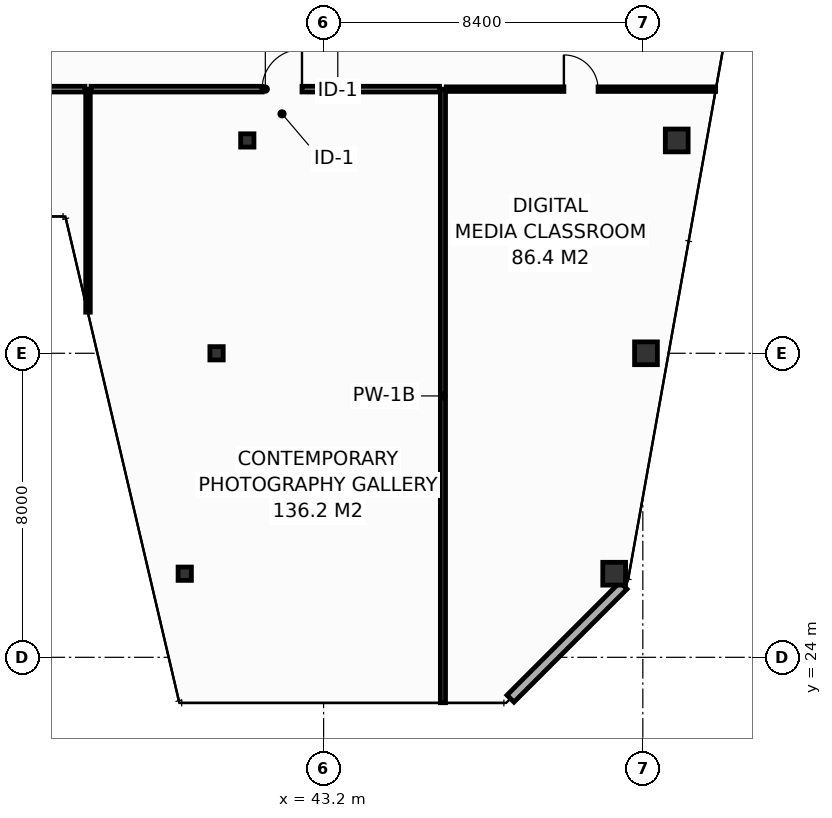
"""IFC4 building model, lengths in metres.
Left out: names, types, materials, properties, quantities, classifications, styles, units other than length and angle.
Written with IfcOpenShell. Run it as: python <this file> out.ifc"""

import sys

from ifc_helpers import new_model, si_unit, direction, frame, frame_2d, origin, origin_2d, place, context, subcontext, project, spatial, rectangle, hollow_rectangle, extrude, element, fill, save


model = new_model("IFC4")
c1 = context("Model", 3, precision=1e-05, world=origin(), true_north=direction((0.0, 1.0)))
c2 = subcontext(c1, "Body", "Model", "MODEL_VIEW")
j1 = project(units=[si_unit("LENGTHUNIT", "METRE"), si_unit("PLANEANGLEUNIT", "RADIAN")], contexts=[c1])
p1 = place(None, origin())
s1 = spatial("IfcSite", under=j1, at=p1, CompositionType="ELEMENT")
p2 = place(p1, origin())
s2 = spatial("IfcBuilding", under=s1, at=p2, CompositionType="ELEMENT")
p3 = place(p2, frame((0.0, 0.0, 264.8)))
s3 = spatial("IfcBuildingStorey", under=s2, at=p3, CompositionType="ELEMENT", Elevation=264.8)
p4 = place(p3, frame((50.846, 26.2, 0.0), z_axis=(0.0, 0.0, 1.0), x_axis=(1.0, 0.0, 0.0)))
e1 = element("IfcColumn", 1, at=p4, inside=s3, PredefinedType="COLUMN", context=c2, shape_type="SweptSolid", body=[
    extrude(hollow_rectangle(XDim=0.6, YDim=0.6, WallThickness=0.028, at=origin_2d()), origin(), (0.0, 0.0, 1.0), 3.8),
])
p5 = place(p3, frame((39.546, 26.2, 0.0), z_axis=(0.0, 0.0, 1.0), x_axis=(1.0, 0.0, 0.0)))
e2 = element("IfcColumn", 2, at=p5, inside=s3, PredefinedType="COLUMN", context=c2, shape_type="SweptSolid", body=[
    extrude(hollow_rectangle(XDim=0.35, YDim=0.35, WallThickness=0.016, at=origin_2d()), origin(), (0.0, 0.0, 1.0), 3.8),
])
p6 = place(p3, frame((51.683, 32.0, 0.0), z_axis=(0.0, 0.0, 1.0), x_axis=(1.0, 0.0, 0.0)))
e3 = element("IfcColumn", 3, at=p6, inside=s3, PredefinedType="COLUMN", context=c2, shape_type="SweptSolid", body=[
    extrude(hollow_rectangle(XDim=0.6, YDim=0.6, WallThickness=0.028, at=origin_2d()), origin(), (0.0, 0.0, 1.0), 3.8),
])
p7 = place(p3, frame((40.383, 32.0, 0.0), z_axis=(0.0, 0.0, 1.0), x_axis=(1.0, 0.0, 0.0)))
e4 = element("IfcColumn", 4, at=p7, inside=s3, PredefinedType="COLUMN", context=c2, shape_type="SweptSolid", body=[
    extrude(hollow_rectangle(XDim=0.35, YDim=0.35, WallThickness=0.016, at=origin_2d()), origin(), (0.0, 0.0, 1.0), 3.8),
])
p8 = place(p3, frame((52.492, 37.6, 0.0), z_axis=(0.0, 0.0, 1.0), x_axis=(1.0, 0.0, 0.0)))
e5 = element("IfcColumn", 5, at=p8, inside=s3, PredefinedType="COLUMN", context=c2, shape_type="SweptSolid", body=[
    extrude(hollow_rectangle(XDim=0.6, YDim=0.6, WallThickness=0.028, at=origin_2d()), origin(), (0.0, 0.0, 1.0), 3.8),
])
p9 = place(p3, frame((41.192, 37.6, 0.0), z_axis=(0.0, 0.0, 1.0), x_axis=(1.0, 0.0, 0.0)))
e6 = element("IfcColumn", 6, at=p9, inside=s3, PredefinedType="COLUMN", context=c2, shape_type="SweptSolid", body=[
    extrude(hollow_rectangle(XDim=0.35, YDim=0.35, WallThickness=0.016, at=origin_2d()), origin(), (0.0, 0.0, 1.0), 3.8),
])
p10 = place(p3, frame((48.117, 22.913, 0.0), z_axis=(0.0, 0.0, 1.0), x_axis=(0.707106781187, 0.707106781187, 0.0)))
e7 = element("IfcWall", 7, at=p10, inside=s3, PredefinedType="STANDARD", context=c2, shape_type="SweptSolid", body=[
    extrude(rectangle(XDim=4.206, YDim=0.26, at=frame_2d((2.103, 0.0))), origin(), (0.0, 0.0, 1.0), 3.55),
])
p11 = place(p3, frame((37.0, 33.081, 0.0), z_axis=(0.0, 0.0, 1.0), x_axis=(0.0, 1.0, 0.0)))
e8 = element("IfcWall", 8, at=p11, inside=s3, PredefinedType="PARTITIONING", context=c2, shape_type="SweptSolid", body=[
    extrude(rectangle(XDim=5.869, YDim=0.12, at=frame_2d((2.935, 0.0))), origin(), (0.0, 0.0, 1.0), 3.55),
])
p12 = place(p3, frame((46.34, 22.805, 0.0), z_axis=(0.0, 0.0, 1.0), x_axis=(0.0, 1.0, 0.0)))
e9 = element("IfcWall", 9, at=p12, inside=s3, PredefinedType="PARTITIONING", context=c2, shape_type="SweptSolid", body=[
    extrude(rectangle(XDim=16.145, YDim=0.135, at=frame_2d((8.073, 0.0))), origin(), (0.0, 0.0, 1.0), 2.947),
])
p13 = place(p3, frame((27.758, 38.95, 0.0), z_axis=(0.0, 0.0, 1.0), x_axis=(1.0, 0.0, 0.0)))
e10 = element("IfcWall", 10, at=p13, inside=s3, PredefinedType="PARTITIONING", context=c2, shape_type="SweptSolid", body=[
    extrude(rectangle(XDim=9.162, YDim=0.15, at=frame_2d((4.581, 0.0))), origin(), (0.0, 0.0, 1.0), 3.55),
])
p14 = place(p13, frame((4.056, 0.0, 0.0)))
e11 = element("IfcOpeningElement", 11, at=p14, cuts=e10, PredefinedType="OPENING", context=c2, shape_type="SweptSolid", body=[
    extrude(rectangle(XDim=1.05, YDim=2.15, at=frame_2d((0.525, 1.075))), frame((0.0, 0.085, 0.0), z_axis=(0.0, -1.0, 0.0), x_axis=(1.0, 0.0, 0.0)), (0.0, 0.0, 1.0), 0.17),
])
p15 = place(p3, frame((37.08, 38.95, 0.0), z_axis=(0.0, 0.0, 1.0), x_axis=(1.0, 0.0, 0.0)))
e12 = element("IfcWall", 12, at=p15, inside=s3, PredefinedType="PARTITIONING", context=c2, shape_type="SweptSolid", body=[
    extrude(rectangle(XDim=9.172, YDim=0.15, at=frame_2d((4.586, 0.0))), origin(), (0.0, 0.0, 1.0), 2.947),
])
p16 = place(p15, frame((4.501, 0.0, 0.0)))
e13 = element("IfcOpeningElement", 13, at=p16, cuts=e12, PredefinedType="OPENING", context=c2, shape_type="SweptSolid", body=[
    extrude(rectangle(XDim=1.05, YDim=2.15, at=frame_2d((0.525, 1.075))), frame((0.0, 0.085, 0.0), z_axis=(0.0, -1.0, 0.0), x_axis=(1.0, 0.0, 0.0)), (0.0, 0.0, 1.0), 0.17),
])
p17 = place(p3, frame((46.427, 38.95, 0.0), z_axis=(0.0, 0.0, 1.0), x_axis=(1.0, 0.0, 0.0)))
e14 = element("IfcWall", 14, at=p17, inside=s3, PredefinedType="PARTITIONING", context=c2, shape_type="SweptSolid", body=[
    extrude(rectangle(XDim=7.089, YDim=0.12, at=frame_2d((3.544, 0.0))), origin(), (0.0, 0.0, 1.0), 3.085),
])
p18 = place(p17, frame((3.095, 0.0, 0.0)))
e15 = element("IfcOpeningElement", 15, at=p18, cuts=e14, PredefinedType="OPENING", context=c2, shape_type="SweptSolid", body=[
    extrude(rectangle(XDim=0.9, YDim=2.1, at=frame_2d((0.45, 1.05))), frame((0.0, 0.07, 0.0), z_axis=(0.0, -1.0, 0.0), x_axis=(1.0, 0.0, 0.0)), (0.0, 0.0, 1.0), 0.14),
])
p19 = place(p16, origin())
e16 = element("IfcDoor", 16, at=p19, inside=s3, OperationType="SINGLE_SWING_RIGHT", PredefinedType="DOOR", context=c2, shape_type="SweptSolid", body=[
    extrude(rectangle(XDim=1.05, YDim=2.15, at=frame_2d((0.525, 1.075))), frame((0.0, 0.025, 0.0), z_axis=(0.0, -1.0, 0.0), x_axis=(1.0, 0.0, 0.0)), (0.0, 0.0, 1.0), 0.05),
])
fill(e13, e16)
p20 = place(p18, origin())
e17 = element("IfcDoor", 17, at=p20, inside=s3, OperationType="SINGLE_SWING_LEFT", PredefinedType="DOOR", context=c2, shape_type="SweptSolid", body=[
    extrude(rectangle(XDim=0.9, YDim=2.1, at=frame_2d((0.45, 1.05))), frame((0.0, 0.025, 0.0), z_axis=(0.0, -1.0, 0.0), x_axis=(1.0, 0.0, 0.0)), (0.0, 0.0, 1.0), 0.05),
])
fill(e15, e17)
save(model, sys.argv[1])
